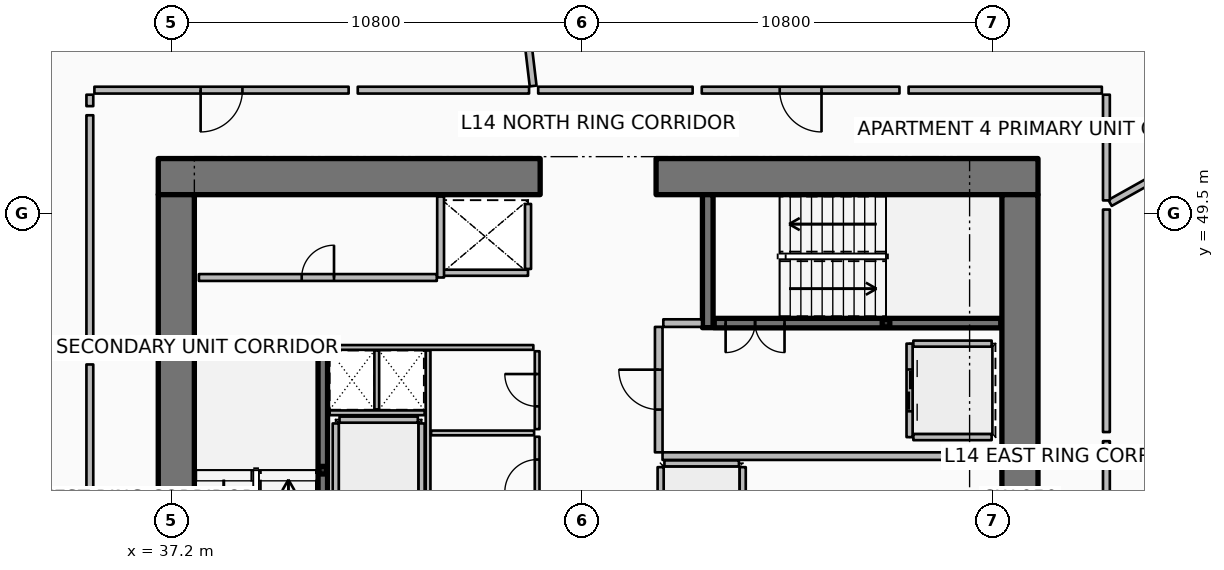
"""IFC4 building model, lengths in metres.
Left out: names, types, materials, properties, quantities, classifications, styles, units other than length and angle.
Written with IfcOpenShell. Run it as: python <this file> out.ifc"""

import sys

from ifc_helpers import new_model, si_unit, direction, frame, frame_2d, origin, origin_2d, place, context, subcontext, project, spatial, rectangle, hollow_rectangle, extrude, element, fill, save


model = new_model("IFC4")
c1 = context("Model", 3, precision=1e-05, world=origin(), true_north=direction((0.0, 1.0)))
c2 = subcontext(c1, "Body", "Model", "MODEL_VIEW")
j1 = project(units=[si_unit("LENGTHUNIT", "METRE"), si_unit("PLANEANGLEUNIT", "RADIAN")], contexts=[c1])
p1 = place(None, origin())
s1 = spatial("IfcSite", under=j1, at=p1, CompositionType="ELEMENT")
p2 = place(p1, origin())
s2 = spatial("IfcBuilding", under=s1, at=p2, CompositionType="ELEMENT")
p3 = place(p2, frame((0.0, 0.0, 60.15)))
s3 = spatial("IfcBuildingStorey", under=s2, at=p3, CompositionType="ELEMENT", Elevation=60.15)
p4 = place(p3, frame((36.85, 50.475, 0.0), z_axis=(0.0, 0.0, 1.0), x_axis=(1.0, 0.0, 0.0)))
e1 = element("IfcWall", 1, at=p4, inside=s3, PredefinedType="SHEAR", context=c2, shape_type="SweptSolid", body=[
    extrude(rectangle(XDim=10.05, YDim=0.95, at=frame_2d((5.025, 0.0))), origin(), (0.0, 0.0, 1.0), 3.75),
])
p5 = place(p3, frame((49.95, 50.475, 0.0), z_axis=(0.0, 0.0, 1.0), x_axis=(1.0, 0.0, 0.0)))
e2 = element("IfcWall", 2, at=p5, inside=s3, PredefinedType="SHEAR", context=c2, shape_type="SweptSolid", body=[
    extrude(rectangle(XDim=10.05, YDim=0.95, at=frame_2d((5.025, 0.0))), origin(), (0.0, 0.0, 1.0), 3.75),
])
for number, where, z_axis, x_axis in (
    (3, (37.325, 34.0, 0.0), (0.0, 0.0, 1.0), (0.0, 1.0, 0.0)),
    (4, (59.525, 34.0, 0.0), (0.0, 0.0, 1.0), (0.0, 1.0, 0.0)),
):
    element("IfcWall", number, at=place(p3, frame(where, z_axis=z_axis, x_axis=x_axis)), inside=s3, PredefinedType="SHEAR", context=c2, shape_type="SweptSolid", body=[
        extrude(rectangle(XDim=16.0, YDim=0.95, at=frame_2d((8.0, 0.0))), origin(), (0.0, 0.0, 1.0), 3.75),
    ])
for number, where, z_axis, x_axis in (
    (5, (37.8, 45.94, 0.0), (0.0, 0.0, 1.0), (1.0, 0.0, 0.0)),
    (6, (51.31, 46.5, 0.0), (0.0, 0.0, 1.0), (0.0, 1.0, 0.0)),
):
    element("IfcWall", number, at=place(p3, frame(where, z_axis=z_axis, x_axis=x_axis)), inside=s3, PredefinedType="SHEAR", context=c2, shape_type="SweptSolid", body=[
        extrude(rectangle(XDim=3.5, YDim=0.28, at=frame_2d((1.75, 0.0))), origin(), (0.0, 0.0, 1.0), 3.75),
    ])
for number, where, z_axis, x_axis in (
    (7, (41.18, 42.75, 0.0), (0.0, 0.0, 1.0), (1.0, 0.0, 0.0)),
    (8, (56.0, 46.62, 0.0), (0.0, 0.0, 1.0), (1.0, 0.0, 0.0)),
):
    element("IfcColumn", number, at=place(p3, frame(where, z_axis=z_axis, x_axis=x_axis)), inside=s3, PredefinedType="COLUMN", context=c2, shape_type="SweptSolid", body=[
        extrude(hollow_rectangle(XDim=0.2, YDim=0.2, WallThickness=0.01, InnerFilletRadius=0.01, OuterFilletRadius=0.02, at=origin_2d()), origin(), (0.0, 0.0, 1.0), 1.67),
    ])
p6 = place(p3, frame((41.18, 38.22, 0.0), z_axis=(0.0, 0.0, 1.0), x_axis=(0.0, 1.0, 0.0)))
e9 = element("IfcWall", 9, at=p6, inside=s3, PredefinedType="SOLIDWALL", context=c2, shape_type="SweptSolid", body=[
    extrude(rectangle(XDim=7.56, YDim=0.25, at=frame_2d((3.78, 0.0))), origin(), (0.0, 0.0, 1.0), 3.5),
])
p7 = place(p6, frame((0.3, 0.0, 0.0)))
e10 = element("IfcOpeningElement", 10, at=p7, cuts=e9, PredefinedType="OPENING", context=c2, shape_type="SweptSolid", body=[
    extrude(rectangle(XDim=1.55, YDim=2.15, at=frame_2d((0.775, 1.075))), frame((0.0, 0.135, 0.0), z_axis=(0.0, -1.0, 0.0), x_axis=(1.0, 0.0, 0.0)), (0.0, 0.0, 1.0), 0.27),
])
p8 = place(p3, frame((51.48, 46.62, 0.0), z_axis=(0.0, 0.0, 1.0), x_axis=(1.0, 0.0, 0.0)))
e11 = element("IfcWall", 11, at=p8, inside=s3, PredefinedType="SOLIDWALL", context=c2, shape_type="SweptSolid", body=[
    extrude(rectangle(XDim=7.54, YDim=0.25, at=frame_2d((3.77, 0.0))), origin(), (0.0, 0.0, 1.0), 3.5),
])
p9 = place(p8, frame((0.3, 0.0, 0.0)))
e12 = element("IfcOpeningElement", 12, at=p9, cuts=e11, PredefinedType="OPENING", context=c2, shape_type="SweptSolid", body=[
    extrude(rectangle(XDim=1.55, YDim=2.15, at=frame_2d((0.775, 1.075))), frame((0.0, 0.135, 0.0), z_axis=(0.0, -1.0, 0.0), x_axis=(1.0, 0.0, 0.0)), (0.0, 0.0, 1.0), 0.27),
])
p10 = place(p3, frame((46.58, 47.945, 0.0), z_axis=(0.0, 0.0, 1.0), x_axis=(-1.0, 0.0, 0.0)))
e13 = element("IfcWall", 13, at=p10, inside=s3, PredefinedType="PARTITIONING", context=c2, shape_type="SweptSolid", body=[
    extrude(rectangle(XDim=2.26, YDim=0.16, at=frame_2d((1.13, 0.0))), origin(), (0.0, 0.0, 1.0), 3.5),
])
p11 = place(p3, frame((46.58, 48.045, 0.0), z_axis=(0.0, 0.0, 1.0), x_axis=(0.0, 1.0, 0.0)))
e14 = element("IfcWall", 14, at=p11, inside=s3, PredefinedType="PARTITIONING", context=c2, shape_type="SweptSolid", body=[
    extrude(rectangle(XDim=1.71, YDim=0.16, at=frame_2d((0.855, 0.0))), origin(), (0.0, 0.0, 1.0), 3.5),
])
for number, where, z_axis, x_axis in (
    (15, (43.78, 41.72, 0.0), (0.0, 0.0, 1.0), (0.0, 1.0, 0.0)),
    (16, (41.52, 41.72, 0.0), (0.0, 0.0, 1.0), (0.0, 1.0, 0.0)),
):
    element("IfcWall", number, at=place(p3, frame(where, z_axis=z_axis, x_axis=x_axis)), inside=s3, PredefinedType="PARTITIONING", context=c2, shape_type="SweptSolid", body=[
        extrude(rectangle(XDim=2.26, YDim=0.16, at=frame_2d((1.13, 0.0))), origin(), (0.0, 0.0, 1.0), 3.5),
    ])
p12 = place(p3, frame((41.62, 44.08, 0.0), z_axis=(0.0, 0.0, 1.0), x_axis=(1.0, 0.0, 0.0)))
e17 = element("IfcWall", 17, at=p12, inside=s3, PredefinedType="PARTITIONING", context=c2, shape_type="SweptSolid", body=[
    extrude(rectangle(XDim=2.06, YDim=0.16, at=frame_2d((1.03, 0.0))), origin(), (0.0, 0.0, 1.0), 3.5),
])
p13 = place(p3, frame((56.62, 46.08, 0.0), z_axis=(0.0, 0.0, 1.0), x_axis=(0.0, -1.0, 0.0)))
e18 = element("IfcWall", 18, at=p13, inside=s3, PredefinedType="PARTITIONING", context=c2, shape_type="SweptSolid", body=[
    extrude(rectangle(XDim=2.46, YDim=0.16, at=frame_2d((1.23, 0.0))), origin(), (0.0, 0.0, 1.0), 3.5),
])
p14 = place(p13, frame((0.68, 0.0, 0.0)))
e19 = element("IfcOpeningElement", 19, at=p14, cuts=e18, PredefinedType="OPENING", context=c2, shape_type="SweptSolid", body=[
    extrude(rectangle(XDim=1.1, YDim=2.1, at=frame_2d((0.55, 1.05))), frame((0.0, 0.09, 0.0), z_axis=(0.0, -1.0, 0.0), x_axis=(1.0, 0.0, 0.0)), (0.0, 0.0, 1.0), 0.18),
])
for number, where, z_axis, x_axis in (
    (20, (56.72, 46.08, 0.0), (0.0, 0.0, 1.0), (1.0, 0.0, 0.0)),
    (21, (56.72, 43.62, 0.0), (0.0, 0.0, 1.0), (1.0, 0.0, 0.0)),
):
    element("IfcWall", number, at=place(p3, frame(where, z_axis=z_axis, x_axis=x_axis)), inside=s3, PredefinedType="PARTITIONING", context=c2, shape_type="SweptSolid", body=[
        extrude(rectangle(XDim=2.06, YDim=0.16, at=frame_2d((1.03, 0.0))), origin(), (0.0, 0.0, 1.0), 3.5),
    ])
for number, where, z_axis, x_axis in (
    (22, (52.23, 40.67, 0.0), (0.0, 0.0, 1.0), (0.0, 1.0, 0.0)),
    (23, (50.07, 40.67, 0.0), (0.0, 0.0, 1.0), (0.0, 1.0, 0.0)),
):
    element("IfcWall", number, at=place(p3, frame(where, z_axis=z_axis, x_axis=x_axis)), inside=s3, PredefinedType="PARTITIONING", context=c2, shape_type="SweptSolid", body=[
        extrude(rectangle(XDim=2.16, YDim=0.16, at=frame_2d((1.08, 0.0))), origin(), (0.0, 0.0, 1.0), 3.5),
    ])
p15 = place(p3, frame((50.17, 42.93, 0.0), z_axis=(0.0, 0.0, 1.0), x_axis=(1.0, 0.0, 0.0)))
e24 = element("IfcWall", 24, at=p15, inside=s3, PredefinedType="PARTITIONING", context=c2, shape_type="SweptSolid", body=[
    extrude(rectangle(XDim=1.96, YDim=0.16, at=frame_2d((0.98, 0.0))), origin(), (0.0, 0.0, 1.0), 3.5),
])
p16 = place(p3, frame((37.92, 47.82, 0.0), z_axis=(0.0, 0.0, 1.0), x_axis=(1.0, 0.0, 0.0)))
e25 = element("IfcWall", 25, at=p16, inside=s3, PredefinedType="PARTITIONING", context=c2, shape_type="SweptSolid", body=[
    extrude(rectangle(XDim=6.26, YDim=0.18, at=frame_2d((3.13, 0.0))), origin(), (0.0, 0.0, 1.0), 3.5),
])
p17 = place(p16, frame((2.705, 0.0, 0.0)))
e26 = element("IfcOpeningElement", 26, at=p17, cuts=e25, PredefinedType="OPENING", context=c2, shape_type="SweptSolid", body=[
    extrude(rectangle(XDim=0.85, YDim=2.06, at=frame_2d((0.425, 1.03))), frame((0.0, 0.1, 0.0), z_axis=(0.0, -1.0, 0.0), x_axis=(1.0, 0.0, 0.0)), (0.0, 0.0, 1.0), 0.2),
])
p18 = place(p3, frame((44.28, 47.82, 0.0), z_axis=(0.0, 0.0, 1.0), x_axis=(0.0, 1.0, 0.0)))
e27 = element("IfcWall", 27, at=p18, inside=s3, PredefinedType="PARTITIONING", context=c2, shape_type="SweptSolid", body=[
    extrude(rectangle(XDim=2.13, YDim=0.18, at=frame_2d((1.065, 0.0))), origin(), (0.0, 0.0, 1.0), 3.5),
])
p19 = place(p3, frame((50.12, 43.12, 0.0), z_axis=(0.0, 0.0, 1.0), x_axis=(1.0, 0.0, 0.0)))
e28 = element("IfcWall", 28, at=p19, inside=s3, PredefinedType="PARTITIONING", context=c2, shape_type="SweptSolid", body=[
    extrude(rectangle(XDim=8.88, YDim=0.2, at=frame_2d((4.44, 0.0))), origin(), (0.0, 0.0, 1.0), 3.5),
])
p20 = place(p3, frame((50.14, 46.62, 0.0), z_axis=(0.0, 0.0, 1.0), x_axis=(1.0, 0.0, 0.0)))
e29 = element("IfcWall", 29, at=p20, inside=s3, PredefinedType="PARTITIONING", context=c2, shape_type="SweptSolid", body=[
    extrude(rectangle(XDim=1.02, YDim=0.2, at=frame_2d((0.51, 0.0))), origin(), (0.0, 0.0, 1.0), 3.5),
])
p21 = place(p3, frame((50.02, 43.22, 0.0), z_axis=(0.0, 0.0, 1.0), x_axis=(0.0, 1.0, 0.0)))
e30 = element("IfcWall", 30, at=p21, inside=s3, PredefinedType="PARTITIONING", context=c2, shape_type="SweptSolid", body=[
    extrude(rectangle(XDim=3.3, YDim=0.2, at=frame_2d((1.65, 0.0))), origin(), (0.0, 0.0, 1.0), 3.5),
])
p22 = place(p21, frame((1.125, 0.0, 0.0)))
e31 = element("IfcOpeningElement", 31, at=p22, cuts=e30, PredefinedType="OPENING", context=c2, shape_type="SweptSolid", body=[
    extrude(rectangle(XDim=1.05, YDim=2.1, at=frame_2d((0.525, 1.05))), frame((0.0, 0.11, 0.0), z_axis=(0.0, -1.0, 0.0), x_axis=(1.0, 0.0, 0.0)), (0.0, 0.0, 1.0), 0.22),
])
p23 = place(p3, frame((41.36, 45.98, 0.0), z_axis=(0.0, 0.0, 1.0), x_axis=(1.0, 0.0, 0.0)))
e32 = element("IfcWall", 32, at=p23, inside=s3, PredefinedType="PARTITIONING", context=c2, shape_type="SweptSolid", body=[
    extrude(rectangle(XDim=5.36, YDim=0.125, at=frame_2d((2.68, 0.0))), origin(), (0.0, 0.0, 1.0), 2.94),
])
p24 = place(p3, frame((41.36, 44.26, 0.0), z_axis=(0.0, 0.0, 1.0), x_axis=(1.0, 0.0, 0.0)))
e33 = element("IfcWall", 33, at=p24, inside=s3, PredefinedType="PARTITIONING", context=c2, shape_type="SweptSolid", body=[
    extrude(rectangle(XDim=2.5, YDim=0.125, at=frame_2d((1.25, 0.0))), origin(), (0.0, 0.0, 1.0), 2.94),
])
p25 = place(p3, frame((42.6, 44.35, 0.0), z_axis=(0.0, 0.0, 1.0), x_axis=(0.0, 1.0, 0.0)))
e34 = element("IfcWall", 34, at=p25, inside=s3, PredefinedType="PARTITIONING", context=c2, shape_type="SweptSolid", body=[
    extrude(rectangle(XDim=1.55, YDim=0.125, at=frame_2d((0.775, 0.0))), origin(), (0.0, 0.0, 1.0), 2.94),
])
p26 = place(p3, frame((43.95, 41.58, 0.0), z_axis=(0.0, 0.0, 1.0), x_axis=(0.0, 1.0, 0.0)))
e35 = element("IfcWall", 35, at=p26, inside=s3, PredefinedType="PARTITIONING", context=c2, shape_type="SweptSolid", body=[
    extrude(rectangle(XDim=4.32, YDim=0.125, at=frame_2d((2.16, 0.0))), origin(), (0.0, 0.0, 1.0), 2.94),
])
p27 = place(p3, frame((44.03, 43.73, 0.0), z_axis=(0.0, 0.0, 1.0), x_axis=(1.0, 0.0, 0.0)))
e36 = element("IfcWall", 36, at=p27, inside=s3, PredefinedType="PARTITIONING", context=c2, shape_type="SweptSolid", body=[
    extrude(rectangle(XDim=2.71, YDim=0.125, at=frame_2d((1.355, 0.0))), origin(), (0.0, 0.0, 1.0), 2.94),
])
p28 = place(p3, frame((46.82, 41.58, 0.0), z_axis=(0.0, 0.0, 1.0), x_axis=(0.0, 1.0, 0.0)))
e37 = element("IfcWall", 37, at=p28, inside=s3, PredefinedType="PARTITIONING", context=c2, shape_type="SweptSolid", body=[
    extrude(rectangle(XDim=2.05, YDim=0.125, at=frame_2d((1.025, 0.0))), origin(), (0.0, 0.0, 1.0), 2.94),
])
p29 = place(p28, frame((0.6, 0.0, 0.0)))
e38 = element("IfcOpeningElement", 38, at=p29, cuts=e37, PredefinedType="OPENING", context=c2, shape_type="SweptSolid", body=[
    extrude(rectangle(XDim=0.85, YDim=2.06, at=frame_2d((0.425, 1.03))), frame((0.0, 0.073, 0.0), z_axis=(0.0, -1.0, 0.0), x_axis=(1.0, 0.0, 0.0)), (0.0, 0.0, 1.0), 0.145),
])
p30 = place(p3, frame((46.82, 43.83, 0.0), z_axis=(0.0, 0.0, 1.0), x_axis=(0.0, 1.0, 0.0)))
e39 = element("IfcWall", 39, at=p30, inside=s3, PredefinedType="PARTITIONING", context=c2, shape_type="SweptSolid", body=[
    extrude(rectangle(XDim=2.05, YDim=0.125, at=frame_2d((1.025, 0.0))), origin(), (0.0, 0.0, 1.0), 2.94),
])
p31 = place(p30, frame((0.6, 0.0, 0.0)))
e40 = element("IfcOpeningElement", 40, at=p31, cuts=e39, PredefinedType="OPENING", context=c2, shape_type="SweptSolid", body=[
    extrude(rectangle(XDim=0.85, YDim=2.06, at=frame_2d((0.425, 1.03))), frame((0.0, 0.073, 0.0), z_axis=(0.0, -1.0, 0.0), x_axis=(1.0, 0.0, 0.0)), (0.0, 0.0, 1.0), 0.145),
])
p32 = place(p3, frame((61.896, 49.782, 0.0), z_axis=(0.0, 0.0, 1.0), x_axis=(0.872493215695, 0.488626225828, 0.0)))
e41 = element("IfcWall", 41, at=p32, inside=s3, PredefinedType="PARTITIONING", context=c2, shape_type="SweptSolid", body=[
    extrude(rectangle(XDim=15.612, YDim=0.18, at=frame_2d((7.806, 0.0))), origin(), (0.0, 0.0, 1.0), 2.867),
])
p33 = place(p3, frame((46.715, 52.859, 0.0), z_axis=(0.0, 0.0, 1.0), x_axis=(-0.117534950089, 0.993068746617, 0.0)))
e42 = element("IfcWall", 42, at=p33, inside=s3, PredefinedType="PARTITIONING", context=c2, shape_type="SweptSolid", body=[
    extrude(rectangle(XDim=14.661, YDim=0.18, at=frame_2d((7.33, 0.0))), origin(), (0.0, 0.0, 1.0), 2.867),
])
p34 = place(p3, frame((41.86, 52.75, 0.0), z_axis=(0.0, 0.0, 1.0), x_axis=(-1.0, 0.0, 0.0)))
e43 = element("IfcWall", 43, at=p34, inside=s3, PredefinedType="PARTITIONING", context=c2, shape_type="SweptSolid", body=[
    extrude(rectangle(XDim=6.69, YDim=0.18, at=frame_2d((3.345, 0.0))), origin(), (0.0, 0.0, 1.0), 2.867),
])
p35 = place(p34, frame((2.795, 0.0, 0.0)))
e44 = element("IfcOpeningElement", 44, at=p35, cuts=e43, PredefinedType="OPENING", context=c2, shape_type="SweptSolid", body=[
    extrude(rectangle(XDim=1.1, YDim=2.1, at=frame_2d((0.55, 1.05))), frame((0.0, 0.1, 0.0), z_axis=(0.0, -1.0, 0.0), x_axis=(1.0, 0.0, 0.0)), (0.0, 0.0, 1.0), 0.2),
])
p36 = place(p3, frame((35.05, 52.63, 0.0), z_axis=(0.0, 0.0, 1.0), x_axis=(0.0, -1.0, 0.0)))
e45 = element("IfcWall", 45, at=p36, inside=s3, PredefinedType="PARTITIONING", context=c2, shape_type="SweptSolid", body=[
    extrude(rectangle(XDim=0.301, YDim=0.18, at=frame_2d((0.15, 0.0))), origin(), (0.0, 0.0, 1.0), 2.867),
])
p37 = place(p3, frame((46.608, 52.75, 0.0), z_axis=(0.0, 0.0, 1.0), x_axis=(-1.0, 0.0, 0.0)))
e46 = element("IfcWall", 46, at=p37, inside=s3, PredefinedType="PARTITIONING", context=c2, shape_type="SweptSolid", body=[
    extrude(rectangle(XDim=4.508, YDim=0.18, at=frame_2d((2.254, 0.0))), origin(), (0.0, 0.0, 1.0), 2.867),
])
p38 = place(p3, frame((35.05, 52.089, 0.0), z_axis=(0.0, 0.0, 1.0), x_axis=(0.0, -1.0, 0.0)))
e47 = element("IfcWall", 47, at=p38, inside=s3, PredefinedType="PARTITIONING", context=c2, shape_type="SweptSolid", body=[
    extrude(rectangle(XDim=6.317, YDim=0.18, at=frame_2d((3.158, 0.0))), origin(), (0.0, 0.0, 1.0), 2.867),
])
p39 = place(p3, frame((35.05, 45.532, 0.0), z_axis=(0.0, 0.0, 1.0), x_axis=(0.0, -1.0, 0.0)))
e48 = element("IfcWall", 48, at=p39, inside=s3, PredefinedType="PARTITIONING", context=c2, shape_type="SweptSolid", body=[
    extrude(rectangle(XDim=4.945, YDim=0.18, at=frame_2d((2.472, 0.0))), origin(), (0.0, 0.0, 1.0), 2.867),
])
p40 = place(p3, frame((61.8, 38.228, 0.0), z_axis=(0.0, 0.0, 1.0), x_axis=(0.0, 1.0, 0.0)))
e49 = element("IfcWall", 49, at=p40, inside=s3, PredefinedType="PARTITIONING", context=c2, shape_type="SweptSolid", body=[
    extrude(rectangle(XDim=5.285, YDim=0.18, at=frame_2d((2.643, 0.0))), origin(), (0.0, 0.0, 1.0), 2.867),
])
p41 = place(p3, frame((61.8, 43.753, 0.0), z_axis=(0.0, 0.0, 1.0), x_axis=(0.0, 1.0, 0.0)))
e50 = element("IfcWall", 50, at=p41, inside=s3, PredefinedType="PARTITIONING", context=c2, shape_type="SweptSolid", body=[
    extrude(rectangle(XDim=5.855, YDim=0.18, at=frame_2d((2.927, 0.0))), origin(), (0.0, 0.0, 1.0), 2.867),
])
p42 = place(p3, frame((56.354, 52.75, 0.0), z_axis=(0.0, 0.0, 1.0), x_axis=(-1.0, 0.0, 0.0)))
e51 = element("IfcWall", 51, at=p42, inside=s3, PredefinedType="PARTITIONING", context=c2, shape_type="SweptSolid", body=[
    extrude(rectangle(XDim=5.203, YDim=0.18, at=frame_2d((2.601, 0.0))), origin(), (0.0, 0.0, 1.0), 2.867),
])
p43 = place(p42, frame((2.052, 0.0, 0.0)))
e52 = element("IfcOpeningElement", 52, at=p43, cuts=e51, PredefinedType="OPENING", context=c2, shape_type="SweptSolid", body=[
    extrude(rectangle(XDim=1.1, YDim=2.1, at=frame_2d((0.55, 1.05))), frame((0.0, 0.1, 0.0), z_axis=(0.0, -1.0, 0.0), x_axis=(1.0, 0.0, 0.0)), (0.0, 0.0, 1.0), 0.2),
])
p44 = place(p3, frame((61.8, 49.848, 0.0), z_axis=(0.0, 0.0, 1.0), x_axis=(0.0, 1.0, 0.0)))
e53 = element("IfcWall", 53, at=p44, inside=s3, PredefinedType="PARTITIONING", context=c2, shape_type="SweptSolid", body=[
    extrude(rectangle(XDim=2.781, YDim=0.18, at=frame_2d((1.391, 0.0))), origin(), (0.0, 0.0, 1.0), 2.867),
])
p45 = place(p3, frame((61.68, 52.75, 0.0), z_axis=(0.0, 0.0, 1.0), x_axis=(-1.0, 0.0, 0.0)))
e54 = element("IfcWall", 54, at=p45, inside=s3, PredefinedType="PARTITIONING", context=c2, shape_type="SweptSolid", body=[
    extrude(rectangle(XDim=5.085, YDim=0.18, at=frame_2d((2.543, 0.0))), origin(), (0.0, 0.0, 1.0), 2.867),
])
p46 = place(p3, frame((50.912, 52.75, 0.0), z_axis=(0.0, 0.0, 1.0), x_axis=(-1.0, 0.0, 0.0)))
e55 = element("IfcWall", 55, at=p46, inside=s3, PredefinedType="PARTITIONING", context=c2, shape_type="SweptSolid", body=[
    extrude(rectangle(XDim=4.064, YDim=0.18, at=frame_2d((2.032, 0.0))), origin(), (0.0, 0.0, 1.0), 2.867),
])
p47 = place(p9, origin())
e56 = element("IfcDoor", 56, at=p47, inside=s3, OperationType="DOUBLE_DOOR_SINGLE_SWING", PredefinedType="DOOR", context=c2, shape_type="SweptSolid", body=[
    extrude(rectangle(XDim=1.55, YDim=2.15, at=frame_2d((0.775, 1.075))), frame((0.0, 0.025, 0.0), z_axis=(0.0, -1.0, 0.0), x_axis=(1.0, 0.0, 0.0)), (0.0, 0.0, 1.0), 0.05),
])
fill(e12, e56)
p48 = place(p14, origin())
e57 = element("IfcDoor", 57, at=p48, inside=s3, OperationType="DOUBLE_DOOR_SLIDING", PredefinedType="DOOR", context=c2, shape_type="SweptSolid", body=[
    extrude(rectangle(XDim=1.1, YDim=2.1, at=frame_2d((0.55, 1.05))), frame((0.0, 0.025, 0.0), z_axis=(0.0, -1.0, 0.0), x_axis=(1.0, 0.0, 0.0)), (0.0, 0.0, 1.0), 0.05),
])
fill(e19, e57)
p49 = place(p17, origin())
e58 = element("IfcDoor", 58, at=p49, inside=s3, OperationType="SINGLE_SWING_RIGHT", PredefinedType="DOOR", context=c2, shape_type="SweptSolid", body=[
    extrude(rectangle(XDim=0.85, YDim=2.06, at=frame_2d((0.425, 1.03))), frame((0.0, 0.025, 0.0), z_axis=(0.0, -1.0, 0.0), x_axis=(1.0, 0.0, 0.0)), (0.0, 0.0, 1.0), 0.05),
])
fill(e26, e58)
p50 = place(p22, origin())
e59 = element("IfcDoor", 59, at=p50, inside=s3, OperationType="SINGLE_SWING_RIGHT", PredefinedType="DOOR", context=c2, shape_type="SweptSolid", body=[
    extrude(rectangle(XDim=1.05, YDim=2.1, at=frame_2d((0.525, 1.05))), frame((0.0, 0.025, 0.0), z_axis=(0.0, -1.0, 0.0), x_axis=(1.0, 0.0, 0.0)), (0.0, 0.0, 1.0), 0.05),
])
fill(e31, e59)
p51 = place(p29, origin())
e60 = element("IfcDoor", 60, at=p51, inside=s3, OperationType="SINGLE_SWING_LEFT", PredefinedType="DOOR", context=c2, shape_type="SweptSolid", body=[
    extrude(rectangle(XDim=0.85, YDim=2.06, at=frame_2d((0.425, 1.03))), frame((0.0, 0.025, 0.0), z_axis=(0.0, -1.0, 0.0), x_axis=(1.0, 0.0, 0.0)), (0.0, 0.0, 1.0), 0.05),
])
fill(e38, e60)
p52 = place(p31, origin())
e61 = element("IfcDoor", 61, at=p52, inside=s3, OperationType="SINGLE_SWING_RIGHT", PredefinedType="DOOR", context=c2, shape_type="SweptSolid", body=[
    extrude(rectangle(XDim=0.85, YDim=2.06, at=frame_2d((0.425, 1.03))), frame((0.0, 0.025, 0.0), z_axis=(0.0, -1.0, 0.0), x_axis=(1.0, 0.0, 0.0)), (0.0, 0.0, 1.0), 0.05),
])
fill(e40, e61)
p53 = place(p35, origin())
e62 = element("IfcDoor", 62, at=p53, inside=s3, OperationType="SINGLE_SWING_RIGHT", PredefinedType="DOOR", context=c2, shape_type="SweptSolid", body=[
    extrude(rectangle(XDim=1.1, YDim=2.1, at=frame_2d((0.55, 1.05))), frame((0.0, 0.025, 0.0), z_axis=(0.0, -1.0, 0.0), x_axis=(1.0, 0.0, 0.0)), (0.0, 0.0, 1.0), 0.05),
])
fill(e44, e62)
p54 = place(p43, origin())
e63 = element("IfcDoor", 63, at=p54, inside=s3, OperationType="SINGLE_SWING_LEFT", PredefinedType="DOOR", context=c2, shape_type="SweptSolid", body=[
    extrude(rectangle(XDim=1.1, YDim=2.1, at=frame_2d((0.55, 1.05))), frame((0.0, 0.025, 0.0), z_axis=(0.0, -1.0, 0.0), x_axis=(1.0, 0.0, 0.0)), (0.0, 0.0, 1.0), 0.05),
])
fill(e52, e63)
save(model, sys.argv[1])
